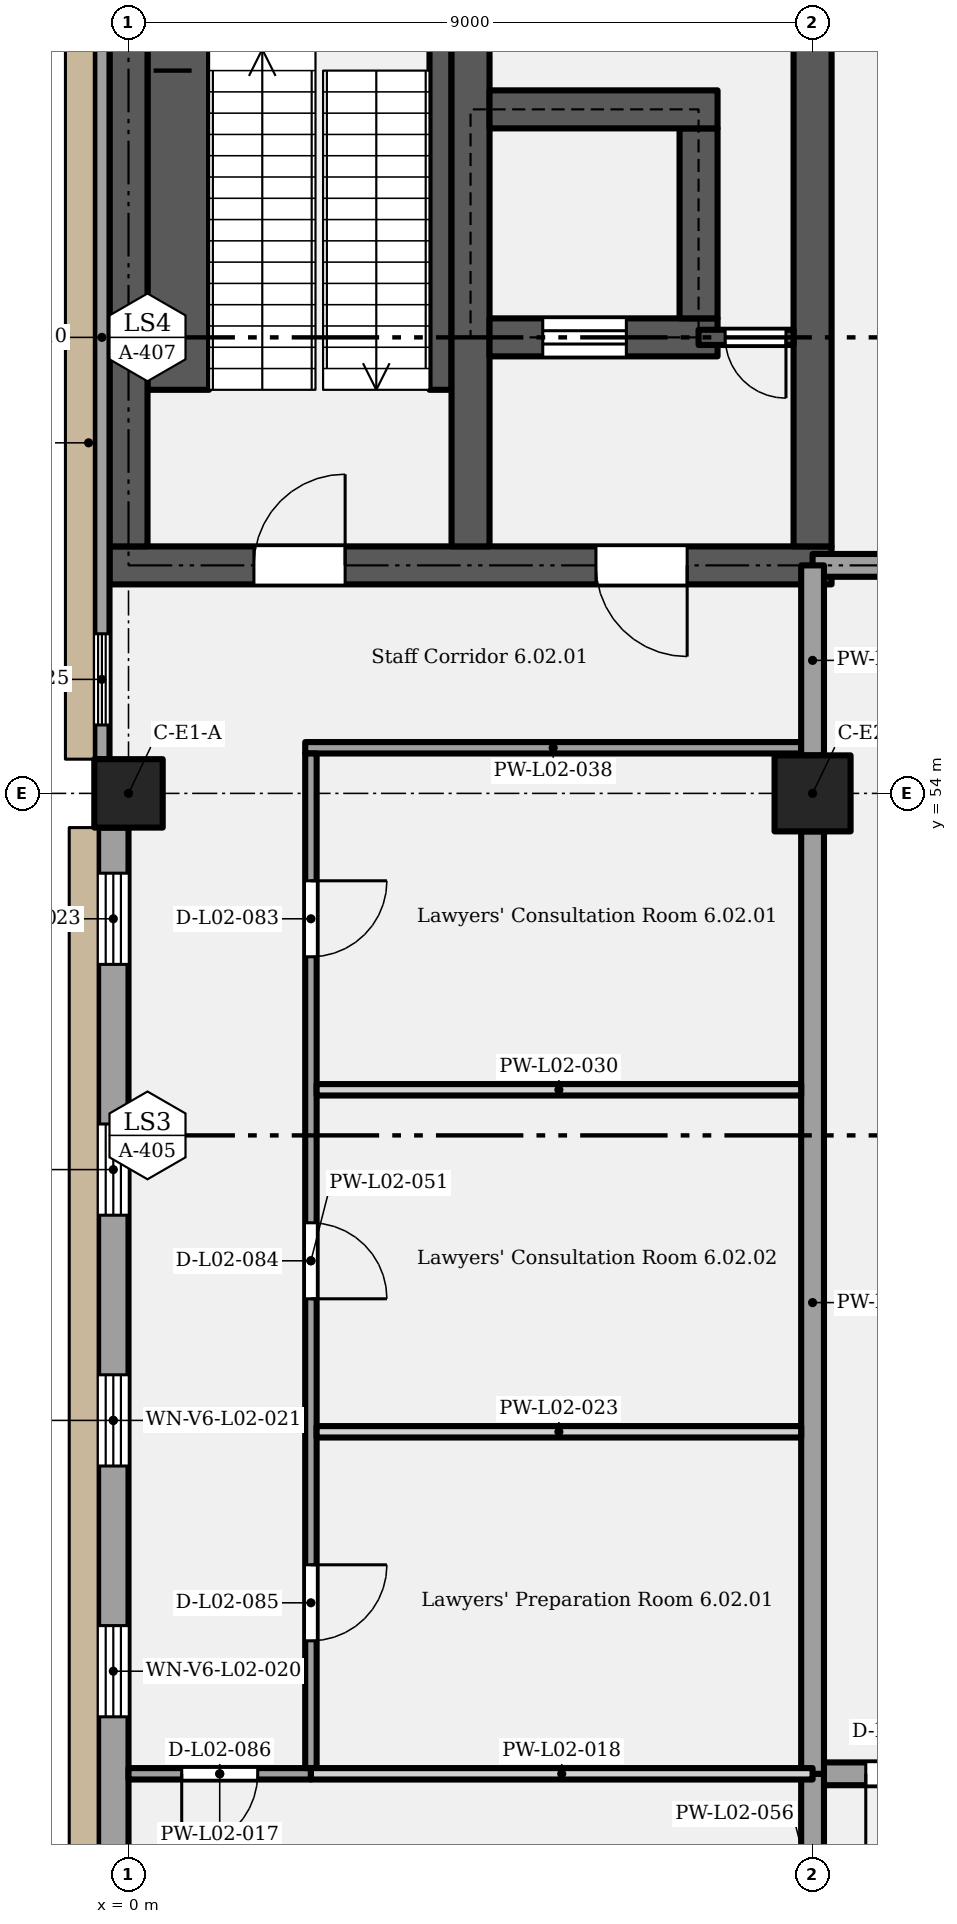
"""IFC4 building model, lengths in metres.
Left out: names, types, materials, properties, quantities, classifications, styles, units other than length and angle.
Written with IfcOpenShell. Run it as: python <this file> out.ifc"""

import sys

from ifc_helpers import new_model, si_unit, direction, frame, frame_2d, origin, origin_2d, place, context, subcontext, project, spatial, rectangle, extrude, element, fill, save


model = new_model("IFC4")
c1 = context("Model", 3, precision=1e-05, world=origin(), true_north=direction((0.0, 1.0)))
c2 = subcontext(c1, "Body", "Model", "MODEL_VIEW")
j1 = project(units=[si_unit("LENGTHUNIT", "METRE"), si_unit("PLANEANGLEUNIT", "RADIAN")], contexts=[c1])
p1 = place(None, origin())
s1 = spatial("IfcSite", under=j1, at=p1, CompositionType="ELEMENT")
p2 = place(p1, origin())
s2 = spatial("IfcBuilding", under=s1, at=p2, CompositionType="ELEMENT")
p3 = place(p2, frame((0.0, 0.0, 12.0)))
s3 = spatial("IfcBuildingStorey", under=s2, at=p3, CompositionType="ELEMENT", Elevation=12.0)
p4 = place(p3, frame((0.0, 54.0, 0.0), z_axis=(0.0, 0.0, 1.0), x_axis=(1.0, 0.0, 0.0)))
e1 = element("IfcColumn", 1, at=p4, inside=s3, PredefinedType="COLUMN", context=c2, shape_type="SweptSolid", body=[
    extrude(rectangle(XDim=0.9, YDim=0.9, at=origin_2d()), origin(), (0.0, 0.0, 1.0), 5.4),
])
p5 = place(p3, frame((9.0, 54.0, 0.0), z_axis=(0.0, 0.0, 1.0), x_axis=(1.0, 0.0, 0.0)))
e2 = element("IfcColumn", 2, at=p5, inside=s3, PredefinedType="COLUMN", context=c2, shape_type="SweptSolid", body=[
    extrude(rectangle(XDim=1.0, YDim=1.0, at=origin_2d()), origin(), (0.0, 0.0, 1.0), 5.4),
])
p6 = place(p3, frame((-0.25, 57.0, 0.0), z_axis=(0.0, 0.0, 1.0), x_axis=(1.0, 0.0, 0.0)))
e3 = element("IfcWall", 3, at=p6, inside=s3, PredefinedType="SHEAR", context=c2, shape_type="SweptSolid", body=[
    extrude(rectangle(XDim=9.5, YDim=0.5, at=frame_2d((4.75, 0.0))), origin(), (0.0, 0.0, 1.0), 5.15),
])
p7 = place(p6, frame((1.9, 0.0, 0.0)))
e4 = element("IfcOpeningElement", 4, at=p7, cuts=e3, PredefinedType="OPENING", context=c2, shape_type="SweptSolid", body=[
    extrude(rectangle(XDim=1.2, YDim=2.1, at=frame_2d((0.6, 1.05))), frame((0.0, 0.26, 0.0), z_axis=(0.0, -1.0, 0.0), x_axis=(1.0, 0.0, 0.0)), (0.0, 0.0, 1.0), 0.52),
])
p8 = place(p6, frame((7.6, 0.0, 0.0), z_axis=(0.0, 0.0, 1.0), x_axis=(-1.0, 0.0, 0.0)))
e5 = element("IfcOpeningElement", 5, at=p8, cuts=e3, PredefinedType="OPENING", context=c2, shape_type="SweptSolid", body=[
    extrude(rectangle(XDim=1.2, YDim=2.1, at=frame_2d((0.6, 1.05))), frame((0.0, 0.26, 0.0), z_axis=(0.0, -1.0, 0.0), x_axis=(1.0, 0.0, 0.0)), (0.0, 0.0, 1.0), 0.52),
])
p9 = place(p3, frame((0.0, 57.25, 0.0), z_axis=(0.0, 0.0, 1.0), x_axis=(0.0, 1.0, 0.0)))
e6 = element("IfcWall", 6, at=p9, inside=s3, PredefinedType="SHEAR", context=c2, shape_type="SweptSolid", body=[
    extrude(rectangle(XDim=8.3, YDim=0.5, at=frame_2d((4.15, 0.0))), origin(), (0.0, 0.0, 1.0), 5.15),
])
p10 = place(p3, frame((4.5, 57.25, 0.0), z_axis=(0.0, 0.0, 1.0), x_axis=(0.0, 1.0, 0.0)))
e7 = element("IfcWall", 7, at=p10, inside=s3, PredefinedType="SHEAR", context=c2, shape_type="SweptSolid", body=[
    extrude(rectangle(XDim=8.5, YDim=0.5, at=frame_2d((4.25, 0.0))), origin(), (0.0, 0.0, 1.0), 5.15),
])
p11 = place(p3, frame((9.0, 57.25, 0.0), z_axis=(0.0, 0.0, 1.0), x_axis=(0.0, 1.0, 0.0)))
e8 = element("IfcWall", 8, at=p11, inside=s3, PredefinedType="SHEAR", context=c2, shape_type="SweptSolid", body=[
    extrude(rectangle(XDim=8.3, YDim=0.5, at=frame_2d((4.15, 0.0))), origin(), (0.0, 0.0, 1.0), 5.15),
])
p12 = place(p3, frame((4.75, 60.0, 0.0), z_axis=(0.0, 0.0, 1.0), x_axis=(1.0, 0.0, 0.0)))
e9 = element("IfcWall", 9, at=p12, inside=s3, PredefinedType="SHEAR", context=c2, shape_type="SweptSolid", body=[
    extrude(rectangle(XDim=3.0, YDim=0.5, at=frame_2d((1.5, 0.0))), origin(), (0.0, 0.0, 1.0), 5.15),
])
p13 = place(p12, frame((0.7, 0.0, 0.0)))
e10 = element("IfcOpeningElement", 10, at=p13, cuts=e9, PredefinedType="OPENING", context=c2, shape_type="SweptSolid", body=[
    extrude(rectangle(XDim=1.1, YDim=2.1, at=frame_2d((0.55, 1.05))), frame((0.0, 0.26, 0.0), z_axis=(0.0, -1.0, 0.0), x_axis=(1.0, 0.0, 0.0)), (0.0, 0.0, 1.0), 0.52),
])
p14 = place(p3, frame((7.5, 60.25, 0.0), z_axis=(0.0, 0.0, 1.0), x_axis=(0.0, 1.0, 0.0)))
e11 = element("IfcWall", 11, at=p14, inside=s3, PredefinedType="SHEAR", context=c2, shape_type="SweptSolid", body=[
    extrude(rectangle(XDim=2.5, YDim=0.5, at=frame_2d((1.25, 0.0))), origin(), (0.0, 0.0, 1.0), 5.15),
])
p15 = place(p3, frame((4.75, 63.0, 0.0), z_axis=(0.0, 0.0, 1.0), x_axis=(1.0, 0.0, 0.0)))
e12 = element("IfcWall", 12, at=p15, inside=s3, PredefinedType="SHEAR", context=c2, shape_type="SweptSolid", body=[
    extrude(rectangle(XDim=3.0, YDim=0.5, at=frame_2d((1.5, 0.0))), origin(), (0.0, 0.0, 1.0), 5.15),
])
p16 = place(p3, frame((-0.2, 37.95, 0.0), z_axis=(0.0, 0.0, 1.0), x_axis=(0.0, 1.0, 0.0)))
e13 = element("IfcWall", 13, at=p16, inside=s3, PredefinedType="SOLIDWALL", context=c2, shape_type="SweptSolid", body=[
    extrude(rectangle(XDim=15.6, YDim=0.4, at=frame_2d((7.8, 0.0))), origin(), (0.0, 0.0, 1.0), 5.15),
])
p17 = place(p16, frame((3.9, 0.0, 0.9)))
e14 = element("IfcOpeningElement", 14, at=p17, cuts=e13, PredefinedType="OPENING", context=c2, shape_type="SweptSolid", body=[
    extrude(rectangle(XDim=1.2, YDim=2.4, at=frame_2d((0.6, 1.2))), frame((0.0, 0.21, 0.0), z_axis=(0.0, -1.0, 0.0), x_axis=(1.0, 0.0, 0.0)), (0.0, 0.0, 1.0), 0.42),
])
p18 = place(p16, frame((7.2, 0.0, 0.9)))
e15 = element("IfcOpeningElement", 15, at=p18, cuts=e13, PredefinedType="OPENING", context=c2, shape_type="SweptSolid", body=[
    extrude(rectangle(XDim=1.2, YDim=2.4, at=frame_2d((0.6, 1.2))), frame((0.0, 0.21, 0.0), z_axis=(0.0, -1.0, 0.0), x_axis=(1.0, 0.0, 0.0)), (0.0, 0.0, 1.0), 0.42),
])
p19 = place(p16, frame((10.5, 0.0, 0.9)))
e16 = element("IfcOpeningElement", 16, at=p19, cuts=e13, PredefinedType="OPENING", context=c2, shape_type="SweptSolid", body=[
    extrude(rectangle(XDim=1.2, YDim=2.4, at=frame_2d((0.6, 1.2))), frame((0.0, 0.21, 0.0), z_axis=(0.0, -1.0, 0.0), x_axis=(1.0, 0.0, 0.0)), (0.0, 0.0, 1.0), 0.42),
])
p20 = place(p16, frame((13.8, 0.0, 0.9)))
e17 = element("IfcOpeningElement", 17, at=p20, cuts=e13, PredefinedType="OPENING", context=c2, shape_type="SweptSolid", body=[
    extrude(rectangle(XDim=1.2, YDim=2.4, at=frame_2d((0.6, 1.2))), frame((0.0, 0.21, 0.0), z_axis=(0.0, -1.0, 0.0), x_axis=(1.0, 0.0, 0.0)), (0.0, 0.0, 1.0), 0.42),
])
p21 = place(p16, frame((0.475, 0.0, 1.5)))
e18 = element("IfcOpeningElement", 18, at=p21, cuts=e13, PredefinedType="OPENING", context=c2, shape_type="SweptSolid", body=[
    extrude(rectangle(XDim=0.9, YDim=1.8, at=frame_2d((0.45, 0.9))), frame((0.0, 0.21, 0.0), z_axis=(0.0, -1.0, 0.0), x_axis=(1.0, 0.0, 0.0)), (0.0, 0.0, 1.0), 0.42),
])
p22 = place(p3, frame((-0.35, 54.45, 0.0), z_axis=(0.0, 0.0, 1.0), x_axis=(0.0, 1.0, 0.0)))
e19 = element("IfcWall", 19, at=p22, inside=s3, PredefinedType="SOLIDWALL", context=c2, shape_type="SweptSolid", body=[
    extrude(rectangle(XDim=11.1, YDim=0.2, at=frame_2d((5.55, 0.0))), origin(), (0.0, 0.0, 1.0), 5.15),
])
p23 = place(p22, frame((0.45, 0.0, 0.9)))
e20 = element("IfcOpeningElement", 20, at=p23, cuts=e19, PredefinedType="OPENING", context=c2, shape_type="SweptSolid", body=[
    extrude(rectangle(XDim=1.2, YDim=2.4, at=frame_2d((0.6, 1.2))), frame((0.0, 0.11, 0.0), z_axis=(0.0, -1.0, 0.0), x_axis=(1.0, 0.0, 0.0)), (0.0, 0.0, 1.0), 0.22),
])
p24 = place(p3, frame((0.0, 41.1, 0.0), z_axis=(0.0, 0.0, 1.0), x_axis=(1.0, 0.0, 0.0)))
e21 = element("IfcWall", 21, at=p24, inside=s3, PredefinedType="PARTITIONING", context=c2, shape_type="SweptSolid", body=[
    extrude(rectangle(XDim=2.4, YDim=0.15, at=frame_2d((1.2, 0.0))), origin(), (0.0, 0.0, 1.0), 5.15),
])
p25 = place(p24, frame((1.7, 0.0, 0.0), z_axis=(0.0, 0.0, 1.0), x_axis=(-1.0, 0.0, 0.0)))
e22 = element("IfcOpeningElement", 22, at=p25, cuts=e21, PredefinedType="OPENING", context=c2, shape_type="SweptSolid", body=[
    extrude(rectangle(XDim=1.0, YDim=2.1, at=frame_2d((0.5, 1.05))), frame((0.0, 0.085, 0.0), z_axis=(0.0, -1.0, 0.0), x_axis=(1.0, 0.0, 0.0)), (0.0, 0.0, 1.0), 0.17),
])
p26 = place(p3, frame((2.4, 41.1, 0.0), z_axis=(0.0, 0.0, 1.0), x_axis=(1.0, 0.0, 0.0)))
e23 = element("IfcWall", 23, at=p26, inside=s3, PredefinedType="PARTITIONING", context=c2, shape_type="SweptSolid", body=[
    extrude(rectangle(XDim=6.6, YDim=0.15, at=frame_2d((3.3, 0.0))), origin(), (0.0, 0.0, 1.0), 5.15),
])
p27 = place(p3, frame((9.0, 41.1, 0.0), z_axis=(0.0, 0.0, 1.0), x_axis=(1.0, 0.0, 0.0)))
e24 = element("IfcWall", 24, at=p27, inside=s3, PredefinedType="PARTITIONING", context=c2, shape_type="SweptSolid", body=[
    extrude(rectangle(XDim=8.85, YDim=0.3, at=frame_2d((4.425, 0.0))), origin(), (0.0, 0.0, 1.0), 5.15),
])
p28 = place(p27, frame((1.7, 0.0, 0.0), z_axis=(0.0, 0.0, 1.0), x_axis=(-1.0, 0.0, 0.0)))
e25 = element("IfcOpeningElement", 25, at=p28, cuts=e24, PredefinedType="OPENING", context=c2, shape_type="SweptSolid", body=[
    extrude(rectangle(XDim=1.0, YDim=2.1, at=frame_2d((0.5, 1.05))), frame((0.0, 0.16, 0.0), z_axis=(0.0, -1.0, 0.0), x_axis=(1.0, 0.0, 0.0)), (0.0, 0.0, 1.0), 0.32),
])
for number, where, z_axis, x_axis in (
    (26, (2.475, 45.6, 0.0), (0.0, 0.0, 1.0), (1.0, 0.0, 0.0)),
    (27, (2.475, 50.1, 0.0), (0.0, 0.0, 1.0), (1.0, 0.0, 0.0)),
):
    element("IfcWall", number, at=place(p3, frame(where, z_axis=z_axis, x_axis=x_axis)), inside=s3, PredefinedType="PARTITIONING", context=c2, shape_type="SweptSolid", body=[
        extrude(rectangle(XDim=6.375, YDim=0.15, at=frame_2d((3.188, 0.0))), origin(), (0.0, 0.0, 1.0), 5.15),
    ])
p29 = place(p3, frame((2.325, 54.6, 0.0), z_axis=(0.0, 0.0, 1.0), x_axis=(1.0, 0.0, 0.0)))
e28 = element("IfcWall", 28, at=p29, inside=s3, PredefinedType="PARTITIONING", context=c2, shape_type="SweptSolid", body=[
    extrude(rectangle(XDim=6.525, YDim=0.15, at=frame_2d((3.263, 0.0))), origin(), (0.0, 0.0, 1.0), 5.15),
])
p30 = place(p3, frame((9.0, 57.0, 0.0), z_axis=(0.0, 0.0, 1.0), x_axis=(1.0, 0.0, 0.0)))
e29 = element("IfcWall", 29, at=p30, inside=s3, PredefinedType="PARTITIONING", context=c2, shape_type="SweptSolid", body=[
    extrude(rectangle(XDim=9.0, YDim=0.3, at=frame_2d((4.5, 0.0))), origin(), (0.0, 0.0, 1.0), 5.15),
])
p31 = place(p30, frame((3.9, 0.0, 0.0)))
e30 = element("IfcOpeningElement", 30, at=p31, cuts=e29, PredefinedType="OPENING", context=c2, shape_type="SweptSolid", body=[
    extrude(rectangle(XDim=1.2, YDim=2.1, at=frame_2d((0.6, 1.05))), frame((0.0, 0.16, 0.0), z_axis=(0.0, -1.0, 0.0), x_axis=(1.0, 0.0, 0.0)), (0.0, 0.0, 1.0), 0.32),
])
p32 = place(p3, frame((7.5, 60.0, 0.0), z_axis=(0.0, 0.0, 1.0), x_axis=(1.0, 0.0, 0.0)))
e31 = element("IfcWall", 31, at=p32, inside=s3, PredefinedType="SHEAR", context=c2, shape_type="SweptSolid", body=[
    extrude(rectangle(XDim=1.25, YDim=0.2, at=frame_2d((0.625, 0.0))), origin(), (0.0, 0.0, 1.0), 5.15),
])
p33 = place(p32, frame((1.15, 0.0, 0.0), z_axis=(0.0, 0.0, 1.0), x_axis=(-1.0, 0.0, 0.0)))
e32 = element("IfcOpeningElement", 32, at=p33, cuts=e31, PredefinedType="OPENING", context=c2, shape_type="SweptSolid", body=[
    extrude(rectangle(XDim=0.8, YDim=2.0, at=frame_2d((0.4, 1.0))), frame((0.0, 0.11, 0.0), z_axis=(0.0, -1.0, 0.0), x_axis=(1.0, 0.0, 0.0)), (0.0, 0.0, 1.0), 0.22),
])
p34 = place(p3, frame((2.4, 41.175, 0.0), z_axis=(0.0, 0.0, 1.0), x_axis=(0.0, 1.0, 0.0)))
e33 = element("IfcWall", 33, at=p34, inside=s3, PredefinedType="PARTITIONING", context=c2, shape_type="SweptSolid", body=[
    extrude(rectangle(XDim=13.35, YDim=0.15, at=frame_2d((6.675, 0.0))), origin(), (0.0, 0.0, 1.0), 5.15),
])
p35 = place(p34, frame((11.675, 0.0, 0.0), z_axis=(0.0, 0.0, 1.0), x_axis=(-1.0, 0.0, 0.0)))
e34 = element("IfcOpeningElement", 34, at=p35, cuts=e33, PredefinedType="OPENING", context=c2, shape_type="SweptSolid", body=[
    extrude(rectangle(XDim=1.0, YDim=2.1, at=frame_2d((0.5, 1.05))), frame((0.0, 0.085, 0.0), z_axis=(0.0, -1.0, 0.0), x_axis=(1.0, 0.0, 0.0)), (0.0, 0.0, 1.0), 0.17),
])
p36 = place(p34, frame((7.175, 0.0, 0.0), z_axis=(0.0, 0.0, 1.0), x_axis=(-1.0, 0.0, 0.0)))
e35 = element("IfcOpeningElement", 35, at=p36, cuts=e33, PredefinedType="OPENING", context=c2, shape_type="SweptSolid", body=[
    extrude(rectangle(XDim=1.0, YDim=2.1, at=frame_2d((0.5, 1.05))), frame((0.0, 0.085, 0.0), z_axis=(0.0, -1.0, 0.0), x_axis=(1.0, 0.0, 0.0)), (0.0, 0.0, 1.0), 0.17),
])
p37 = place(p34, frame((2.675, 0.0, 0.0), z_axis=(0.0, 0.0, 1.0), x_axis=(-1.0, 0.0, 0.0)))
e36 = element("IfcOpeningElement", 36, at=p37, cuts=e33, PredefinedType="OPENING", context=c2, shape_type="SweptSolid", body=[
    extrude(rectangle(XDim=1.0, YDim=2.1, at=frame_2d((0.5, 1.05))), frame((0.0, 0.085, 0.0), z_axis=(0.0, -1.0, 0.0), x_axis=(1.0, 0.0, 0.0)), (0.0, 0.0, 1.0), 0.17),
])
p38 = place(p3, frame((9.0, 38.0, 0.0), z_axis=(0.0, 0.0, 1.0), x_axis=(0.0, 1.0, 0.0)))
e37 = element("IfcWall", 37, at=p38, inside=s3, PredefinedType="PARTITIONING", context=c2, shape_type="SweptSolid", body=[
    extrude(rectangle(XDim=3.1, YDim=0.3, at=frame_2d((1.55, 0.0))), origin(), (0.0, 0.0, 1.0), 4.2),
])
p39 = place(p3, frame((9.0, 41.1, 0.0), z_axis=(0.0, 0.0, 1.0), x_axis=(0.0, 1.0, 0.0)))
e38 = element("IfcWall", 38, at=p39, inside=s3, PredefinedType="PARTITIONING", context=c2, shape_type="SweptSolid", body=[
    extrude(rectangle(XDim=12.4, YDim=0.3, at=frame_2d((6.2, 0.0))), origin(), (0.0, 0.0, 1.0), 4.2),
])
p40 = place(p3, frame((9.0, 54.5, 0.0), z_axis=(0.0, 0.0, 1.0), x_axis=(0.0, 1.0, 0.0)))
e39 = element("IfcWall", 39, at=p40, inside=s3, PredefinedType="PARTITIONING", context=c2, shape_type="SweptSolid", body=[
    extrude(rectangle(XDim=2.5, YDim=0.3, at=frame_2d((1.25, 0.0))), origin(), (0.0, 0.0, 1.0), 4.4),
])
p41 = place(p3, frame((0.655, 59.31, 0.0), z_axis=(0.0, 0.0, 1.0), x_axis=(0.0, 1.0, 0.0)))
e40 = element("IfcWall", 40, at=p41, inside=s3, PredefinedType="SHEAR", context=c2, shape_type="SweptSolid", body=[
    extrude(rectangle(XDim=6.19, YDim=0.81, at=frame_2d((3.095, 0.0))), origin(), (0.0, 0.0, 1.0), 2.587),
])
p42 = place(p3, frame((4.105, 59.31, 0.0), z_axis=(0.0, 0.0, 1.0), x_axis=(0.0, 1.0, 0.0)))
e41 = element("IfcWall", 41, at=p42, inside=s3, PredefinedType="SHEAR", context=c2, shape_type="SweptSolid", body=[
    extrude(rectangle(XDim=6.44, YDim=0.29, at=frame_2d((3.22, 0.0))), origin(), (0.0, 0.0, 1.0), 2.587),
])
p43 = place(p17, origin())
e42 = element("IfcWindow", 42, at=p43, inside=s3, PartitioningType="SINGLE_PANEL", PredefinedType="WINDOW", context=c2, shape_type="SweptSolid", body=[
    extrude(rectangle(XDim=1.2, YDim=2.4, at=frame_2d((0.6, 1.2))), frame((0.0, 0.03, 0.0), z_axis=(0.0, -1.0, 0.0), x_axis=(1.0, 0.0, 0.0)), (0.0, 0.0, 1.0), 0.06),
])
fill(e14, e42)
p44 = place(p18, origin())
e43 = element("IfcWindow", 43, at=p44, inside=s3, PartitioningType="SINGLE_PANEL", PredefinedType="WINDOW", context=c2, shape_type="SweptSolid", body=[
    extrude(rectangle(XDim=1.2, YDim=2.4, at=frame_2d((0.6, 1.2))), frame((0.0, 0.03, 0.0), z_axis=(0.0, -1.0, 0.0), x_axis=(1.0, 0.0, 0.0)), (0.0, 0.0, 1.0), 0.06),
])
fill(e15, e43)
p45 = place(p19, origin())
e44 = element("IfcWindow", 44, at=p45, inside=s3, PartitioningType="SINGLE_PANEL", PredefinedType="WINDOW", context=c2, shape_type="SweptSolid", body=[
    extrude(rectangle(XDim=1.2, YDim=2.4, at=frame_2d((0.6, 1.2))), frame((0.0, 0.03, 0.0), z_axis=(0.0, -1.0, 0.0), x_axis=(1.0, 0.0, 0.0)), (0.0, 0.0, 1.0), 0.06),
])
fill(e16, e44)
p46 = place(p20, origin())
e45 = element("IfcWindow", 45, at=p46, inside=s3, PartitioningType="SINGLE_PANEL", PredefinedType="WINDOW", context=c2, shape_type="SweptSolid", body=[
    extrude(rectangle(XDim=1.2, YDim=2.4, at=frame_2d((0.6, 1.2))), frame((0.0, 0.03, 0.0), z_axis=(0.0, -1.0, 0.0), x_axis=(1.0, 0.0, 0.0)), (0.0, 0.0, 1.0), 0.06),
])
fill(e17, e45)
p47 = place(p23, origin())
e46 = element("IfcWindow", 46, at=p47, inside=s3, PartitioningType="SINGLE_PANEL", PredefinedType="WINDOW", context=c2, shape_type="SweptSolid", body=[
    extrude(rectangle(XDim=1.2, YDim=2.4, at=frame_2d((0.6, 1.2))), frame((0.0, 0.03, 0.0), z_axis=(0.0, -1.0, 0.0), x_axis=(1.0, 0.0, 0.0)), (0.0, 0.0, 1.0), 0.06),
])
fill(e20, e46)
p48 = place(p7, origin())
e47 = element("IfcDoor", 47, at=p48, inside=s3, OperationType="SINGLE_SWING_RIGHT", PredefinedType="DOOR", context=c2, shape_type="SweptSolid", body=[
    extrude(rectangle(XDim=1.2, YDim=2.1, at=frame_2d((0.6, 1.05))), frame((0.0, 0.025, 0.0), z_axis=(0.0, -1.0, 0.0), x_axis=(1.0, 0.0, 0.0)), (0.0, 0.0, 1.0), 0.05),
])
fill(e4, e47)
p49 = place(p8, origin())
e48 = element("IfcDoor", 48, at=p49, inside=s3, OperationType="SINGLE_SWING_LEFT", PredefinedType="DOOR", context=c2, shape_type="SweptSolid", body=[
    extrude(rectangle(XDim=1.2, YDim=2.1, at=frame_2d((0.6, 1.05))), frame((0.0, 0.025, 0.0), z_axis=(0.0, -1.0, 0.0), x_axis=(1.0, 0.0, 0.0)), (0.0, 0.0, 1.0), 0.05),
])
fill(e5, e48)
p50 = place(p13, origin())
e49 = element("IfcDoor", 49, at=p50, inside=s3, OperationType="SLIDING_TO_LEFT", PredefinedType="DOOR", context=c2, shape_type="SweptSolid", body=[
    extrude(rectangle(XDim=1.1, YDim=2.1, at=frame_2d((0.55, 1.05))), frame((0.0, 0.025, 0.0), z_axis=(0.0, -1.0, 0.0), x_axis=(1.0, 0.0, 0.0)), (0.0, 0.0, 1.0), 0.05),
])
fill(e10, e49)
p51 = place(p33, origin())
e50 = element("IfcDoor", 50, at=p51, inside=s3, OperationType="SINGLE_SWING_LEFT", PredefinedType="DOOR", context=c2, shape_type="SweptSolid", body=[
    extrude(rectangle(XDim=0.8, YDim=2.0, at=frame_2d((0.4, 1.0))), frame((0.0, 0.025, 0.0), z_axis=(0.0, -1.0, 0.0), x_axis=(1.0, 0.0, 0.0)), (0.0, 0.0, 1.0), 0.05),
])
fill(e32, e50)
p52 = place(p35, origin())
e51 = element("IfcDoor", 51, at=p52, inside=s3, OperationType="SINGLE_SWING_LEFT", PredefinedType="DOOR", context=c2, shape_type="SweptSolid", body=[
    extrude(rectangle(XDim=1.0, YDim=2.1, at=frame_2d((0.5, 1.05))), frame((0.0, 0.025, 0.0), z_axis=(0.0, -1.0, 0.0), x_axis=(1.0, 0.0, 0.0)), (0.0, 0.0, 1.0), 0.05),
])
fill(e34, e51)
p53 = place(p36, origin())
e52 = element("IfcDoor", 52, at=p53, inside=s3, OperationType="SINGLE_SWING_RIGHT", PredefinedType="DOOR", context=c2, shape_type="SweptSolid", body=[
    extrude(rectangle(XDim=1.0, YDim=2.1, at=frame_2d((0.5, 1.05))), frame((0.0, 0.025, 0.0), z_axis=(0.0, -1.0, 0.0), x_axis=(1.0, 0.0, 0.0)), (0.0, 0.0, 1.0), 0.05),
])
fill(e35, e52)
p54 = place(p37, origin())
e53 = element("IfcDoor", 53, at=p54, inside=s3, OperationType="SINGLE_SWING_LEFT", PredefinedType="DOOR", context=c2, shape_type="SweptSolid", body=[
    extrude(rectangle(XDim=1.0, YDim=2.1, at=frame_2d((0.5, 1.05))), frame((0.0, 0.025, 0.0), z_axis=(0.0, -1.0, 0.0), x_axis=(1.0, 0.0, 0.0)), (0.0, 0.0, 1.0), 0.05),
])
fill(e36, e53)
p55 = place(p25, origin())
e54 = element("IfcDoor", 54, at=p55, inside=s3, OperationType="SINGLE_SWING_RIGHT", PredefinedType="DOOR", context=c2, shape_type="SweptSolid", body=[
    extrude(rectangle(XDim=1.0, YDim=2.1, at=frame_2d((0.5, 1.05))), frame((0.0, 0.025, 0.0), z_axis=(0.0, -1.0, 0.0), x_axis=(1.0, 0.0, 0.0)), (0.0, 0.0, 1.0), 0.05),
])
fill(e22, e54)
p56 = place(p28, origin())
e55 = element("IfcDoor", 55, at=p56, inside=s3, OperationType="SINGLE_SWING_RIGHT", PredefinedType="DOOR", context=c2, shape_type="SweptSolid", body=[
    extrude(rectangle(XDim=1.0, YDim=2.1, at=frame_2d((0.5, 1.05))), frame((0.0, 0.025, 0.0), z_axis=(0.0, -1.0, 0.0), x_axis=(1.0, 0.0, 0.0)), (0.0, 0.0, 1.0), 0.05),
])
fill(e25, e55)
save(model, sys.argv[1])
